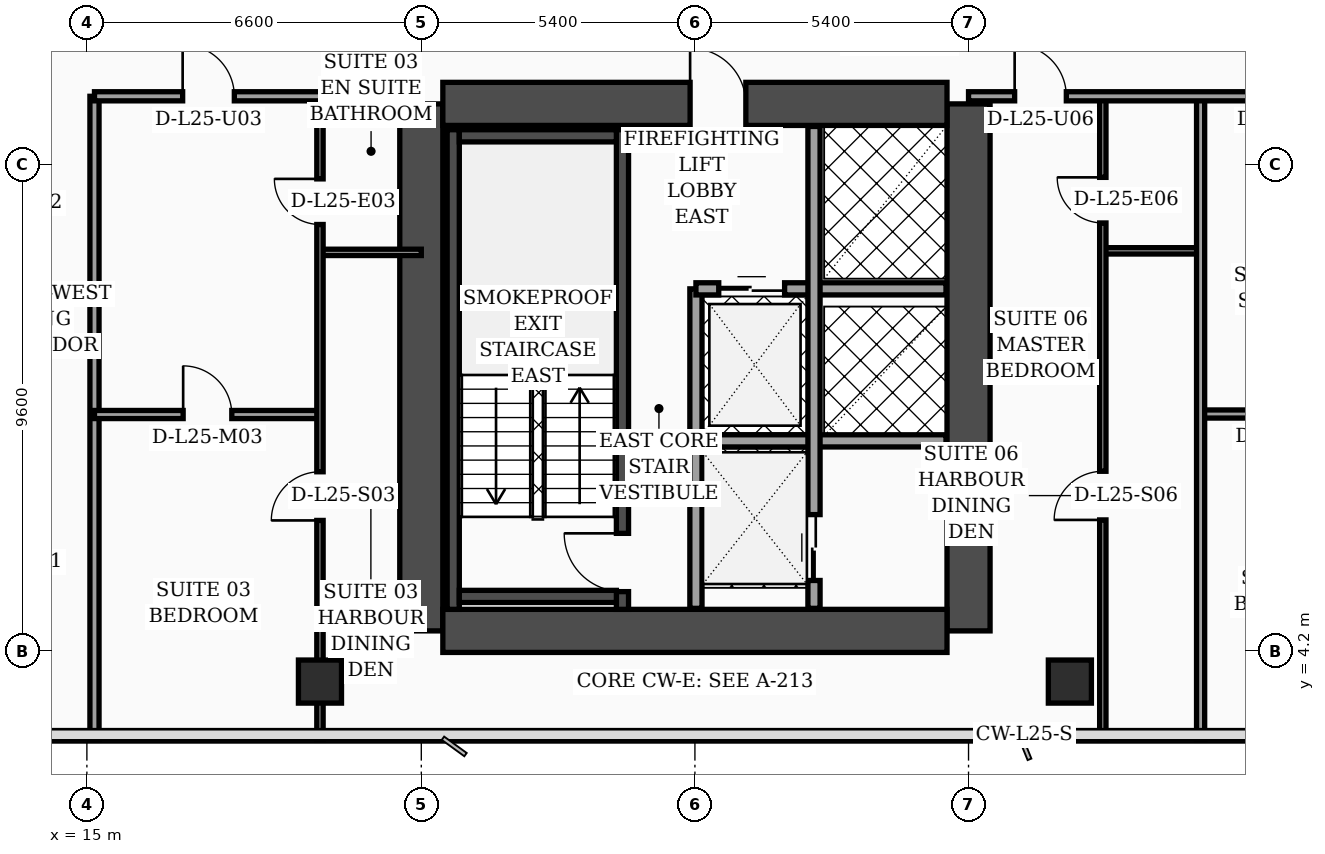
"""IFC4 building model, lengths in metres.
Left out: names, types, materials, properties, quantities, classifications, styles, units other than length and angle.
Written with IfcOpenShell. Run it as: python <this file> out.ifc"""

import sys

from ifc_helpers import new_model, si_unit, direction, frame, frame_2d, origin, origin_2d, place, context, subcontext, project, spatial, rectangle, hollow_rectangle, extrude, element, fill, save


model = new_model("IFC4")
c1 = context("Model", 3, precision=1e-05, world=origin(), true_north=direction((0.0, 1.0)))
c2 = subcontext(c1, "Body", "Model", "MODEL_VIEW")
j1 = project(units=[si_unit("LENGTHUNIT", "METRE"), si_unit("PLANEANGLEUNIT", "RADIAN")], contexts=[c1])
p1 = place(None, origin())
s1 = spatial("IfcSite", under=j1, at=p1, CompositionType="ELEMENT")
p2 = place(p1, origin())
s2 = spatial("IfcBuilding", under=s1, at=p2, CompositionType="ELEMENT")
p3 = place(p2, frame((0.0, 0.0, 105.0)))
s3 = spatial("IfcBuildingStorey", under=s2, at=p3, CompositionType="ELEMENT", Elevation=105.0)
for number, where, z_axis, x_axis in (
    (1, (21.6, 4.6, 0.0), (0.0, 0.0, 1.0), (0.0, 1.0, 0.0)),
    (2, (32.4, 4.6, 0.0), (0.0, 0.0, 1.0), (0.0, 1.0, 0.0)),
):
    element("IfcWall", number, at=place(p3, frame(where, z_axis=z_axis, x_axis=x_axis)), inside=s3, PredefinedType="SHEAR", context=c2, shape_type="SweptSolid", body=[
        extrude(rectangle(XDim=10.4, YDim=0.85, at=frame_2d((5.2, 0.0))), origin(), (0.0, 0.0, 1.0), 3.56),
    ])
p4 = place(p3, frame((22.025, 15.0, 0.0), z_axis=(0.0, 0.0, 1.0), x_axis=(1.0, 0.0, 0.0)))
e3 = element("IfcWall", 3, at=p4, inside=s3, PredefinedType="SHEAR", context=c2, shape_type="SweptSolid", body=[
    extrude(rectangle(XDim=9.95, YDim=0.85, at=frame_2d((4.975, 0.0))), origin(), (0.0, 0.0, 1.0), 3.56),
])
p5 = place(p4, frame((4.88, 0.0, 0.0)))
e4 = element("IfcOpeningElement", 4, at=p5, cuts=e3, PredefinedType="OPENING", context=c2, shape_type="SweptSolid", body=[
    extrude(rectangle(XDim=1.1, YDim=2.2, at=frame_2d((0.55, 1.1))), frame((0.0, 0.435, 0.0), z_axis=(0.0, -1.0, 0.0), x_axis=(1.0, 0.0, 0.0)), (0.0, 0.0, 1.0), 0.87),
])
p6 = place(p3, frame((22.025, 4.6, 0.0), z_axis=(0.0, 0.0, 1.0), x_axis=(1.0, 0.0, 0.0)))
e5 = element("IfcWall", 5, at=p6, inside=s3, PredefinedType="SHEAR", context=c2, shape_type="SweptSolid", body=[
    extrude(rectangle(XDim=9.95, YDim=0.85, at=frame_2d((4.975, 0.0))), origin(), (0.0, 0.0, 1.0), 3.56),
])
p7 = place(p3, frame((22.23, 5.025, 0.0), z_axis=(0.0, 0.0, 1.0), x_axis=(0.0, 1.0, 0.0)))
e6 = element("IfcWall", 6, at=p7, inside=s3, PredefinedType="SOLIDWALL", context=c2, shape_type="SweptSolid", body=[
    extrude(rectangle(XDim=9.465, YDim=0.24, at=frame_2d((4.732, 0.0))), origin(), (0.0, 0.0, 1.0), 3.56),
])
p8 = place(p3, frame((25.57, 5.025, 0.0), z_axis=(0.0, 0.0, 1.0), x_axis=(0.0, 1.0, 0.0)))
e7 = element("IfcWall", 7, at=p8, inside=s3, PredefinedType="SOLIDWALL", context=c2, shape_type="SweptSolid", body=[
    extrude(rectangle(XDim=9.465, YDim=0.24, at=frame_2d((4.732, 0.0))), origin(), (0.0, 0.0, 1.0), 3.56),
])
p9 = place(p8, frame((0.35, 0.0, 0.0)))
e8 = element("IfcOpeningElement", 8, at=p9, cuts=e7, PredefinedType="OPENING", context=c2, shape_type="SweptSolid", body=[
    extrude(rectangle(XDim=1.15, YDim=2.2, at=frame_2d((0.575, 1.1))), frame((0.0, 0.13, 0.0), z_axis=(0.0, -1.0, 0.0), x_axis=(1.0, 0.0, 0.0)), (0.0, 0.0, 1.0), 0.26),
])
for number, where, z_axis, x_axis in (
    (9, (22.35, 5.28, 0.0), (0.0, 0.0, 1.0), (1.0, 0.0, 0.0)),
    (10, (22.35, 14.37, 0.0), (0.0, 0.0, 1.0), (1.0, 0.0, 0.0)),
):
    element("IfcWall", number, at=place(p3, frame(where, z_axis=z_axis, x_axis=x_axis)), inside=s3, PredefinedType="SOLIDWALL", context=c2, shape_type="SweptSolid", body=[
        extrude(rectangle(XDim=3.1, YDim=0.24, at=frame_2d((1.55, 0.0))), origin(), (0.0, 0.0, 1.0), 3.56),
    ])
for number, where, z_axis, x_axis in (
    (11, (19.6, 3.6, 0.0), (0.0, 0.0, 1.0), (1.0, 0.0, 0.0)),
    (12, (34.4, 3.6, 0.0), (0.0, 0.0, 1.0), (1.0, 0.0, 0.0)),
):
    element("IfcColumn", number, at=place(p3, frame(where, z_axis=z_axis, x_axis=x_axis)), inside=s3, PredefinedType="COLUMN", context=c2, shape_type="SweptSolid", body=[
        extrude(hollow_rectangle(XDim=0.85, YDim=0.85, WallThickness=0.036, at=origin_2d()), origin(), (0.0, 0.0, 1.0), 3.56),
    ])
p10 = place(p3, frame((27.02, 5.045, 0.0), z_axis=(0.0, 0.0, 1.0), x_axis=(0.0, 1.0, 0.0)))
e13 = element("IfcWall", 13, at=p10, inside=s3, PredefinedType="SOLIDWALL", context=c2, shape_type="SweptSolid", body=[
    extrude(rectangle(XDim=6.305, YDim=0.24, at=frame_2d((3.153, 0.0))), origin(), (0.0, 0.0, 1.0), 3.56),
])
p11 = place(p3, frame((27.02, 11.35, 0.0), z_axis=(0.0, 0.0, 1.0), x_axis=(1.0, 0.0, 0.0)))
e14 = element("IfcWall", 14, at=p11, inside=s3, PredefinedType="SOLIDWALL", context=c2, shape_type="SweptSolid", body=[
    extrude(rectangle(XDim=4.935, YDim=0.24, at=frame_2d((2.468, 0.0))), origin(), (0.0, 0.0, 1.0), 3.56),
])
p12 = place(p11, frame((0.45, 0.0, 0.0)))
e15 = element("IfcOpeningElement", 15, at=p12, cuts=e14, PredefinedType="OPENING", context=c2, shape_type="SweptSolid", body=[
    extrude(rectangle(XDim=1.3, YDim=2.35, at=frame_2d((0.65, 1.175))), frame((0.0, 0.13, 0.0), z_axis=(0.0, -1.0, 0.0), x_axis=(1.0, 0.0, 0.0)), (0.0, 0.0, 1.0), 0.26),
])
p13 = place(p3, frame((27.02, 8.35, 0.0), z_axis=(0.0, 0.0, 1.0), x_axis=(1.0, 0.0, 0.0)))
e16 = element("IfcWall", 16, at=p13, inside=s3, PredefinedType="SOLIDWALL", context=c2, shape_type="SweptSolid", body=[
    extrude(rectangle(XDim=4.935, YDim=0.24, at=frame_2d((2.468, 0.0))), origin(), (0.0, 0.0, 1.0), 3.56),
])
p14 = place(p3, frame((29.35, 5.045, 0.0), z_axis=(0.0, 0.0, 1.0), x_axis=(0.0, 1.0, 0.0)))
e17 = element("IfcWall", 17, at=p14, inside=s3, PredefinedType="SOLIDWALL", context=c2, shape_type="SweptSolid", body=[
    extrude(rectangle(XDim=9.51, YDim=0.24, at=frame_2d((4.755, 0.0))), origin(), (0.0, 0.0, 1.0), 3.56),
])
p15 = place(p14, frame((0.55, 0.0, 0.0)))
e18 = element("IfcOpeningElement", 18, at=p15, cuts=e17, PredefinedType="OPENING", context=c2, shape_type="SweptSolid", body=[
    extrude(rectangle(XDim=1.3, YDim=2.35, at=frame_2d((0.65, 1.175))), frame((0.0, 0.13, 0.0), z_axis=(0.0, -1.0, 0.0), x_axis=(1.0, 0.0, 0.0)), (0.0, 0.0, 1.0), 0.26),
])
p16 = place(p3, frame((15.15, 2.44, 0.0), z_axis=(0.0, 0.0, 1.0), x_axis=(0.0, 1.0, 0.0)))
e19 = element("IfcWall", 19, at=p16, inside=s3, PredefinedType="PARTITIONING", context=c2, shape_type="SweptSolid", body=[
    extrude(rectangle(XDim=12.71, YDim=0.18, at=frame_2d((6.355, 0.0))), origin(), (0.0, 0.0, 1.0), 3.04),
])
p17 = place(p3, frame((19.6, 12.07, 0.0), z_axis=(0.0, 0.0, 1.0), x_axis=(1.0, 0.0, 0.0)))
e20 = element("IfcWall", 20, at=p17, inside=s3, PredefinedType="PARTITIONING", context=c2, shape_type="SweptSolid", body=[
    extrude(rectangle(XDim=2.0, YDim=0.125, at=frame_2d((1.0, 0.0))), origin(), (0.0, 0.0, 1.0), 3.56),
])
p18 = place(p3, frame((15.15, 8.87, 0.0), z_axis=(0.0, 0.0, 1.0), x_axis=(1.0, 0.0, 0.0)))
e21 = element("IfcWall", 21, at=p18, inside=s3, PredefinedType="PARTITIONING", context=c2, shape_type="SweptSolid", body=[
    extrude(rectangle(XDim=4.45, YDim=0.16, at=frame_2d((2.225, 0.0))), origin(), (0.0, 0.0, 1.0), 3.56),
])
p19 = place(p18, frame((1.75, 0.0, 0.0)))
e22 = element("IfcOpeningElement", 22, at=p19, cuts=e21, PredefinedType="OPENING", context=c2, shape_type="SweptSolid", body=[
    extrude(rectangle(XDim=0.96, YDim=2.2, at=frame_2d((0.48, 1.1))), frame((0.0, 0.09, 0.0), z_axis=(0.0, -1.0, 0.0), x_axis=(1.0, 0.0, 0.0)), (0.0, 0.0, 1.0), 0.18),
])
p20 = place(p3, frame((19.6, 2.44, 0.0), z_axis=(0.0, 0.0, 1.0), x_axis=(0.0, 1.0, 0.0)))
e23 = element("IfcWall", 23, at=p20, inside=s3, PredefinedType="PARTITIONING", context=c2, shape_type="SweptSolid", body=[
    extrude(rectangle(XDim=12.71, YDim=0.125, at=frame_2d((6.355, 0.0))), origin(), (0.0, 0.0, 1.0), 2.49),
])
p21 = place(p20, frame((4.34, 0.0, 0.0)))
e24 = element("IfcOpeningElement", 24, at=p21, cuts=e23, PredefinedType="OPENING", context=c2, shape_type="SweptSolid", body=[
    extrude(rectangle(XDim=0.96, YDim=2.2, at=frame_2d((0.48, 1.1))), frame((0.0, 0.073, 0.0), z_axis=(0.0, -1.0, 0.0), x_axis=(1.0, 0.0, 0.0)), (0.0, 0.0, 1.0), 0.145),
])
p22 = place(p20, frame((10.18, 0.0, 0.0)))
e25 = element("IfcOpeningElement", 25, at=p22, cuts=e23, PredefinedType="OPENING", context=c2, shape_type="SweptSolid", body=[
    extrude(rectangle(XDim=0.9, YDim=2.15, at=frame_2d((0.45, 1.075))), frame((0.0, 0.073, 0.0), z_axis=(0.0, -1.0, 0.0), x_axis=(1.0, 0.0, 0.0)), (0.0, 0.0, 1.0), 0.145),
])
p23 = place(p3, frame((15.15, 15.15, 0.0), z_axis=(0.0, 0.0, 1.0), x_axis=(1.0, 0.0, 0.0)))
e26 = element("IfcWall", 26, at=p23, inside=s3, PredefinedType="PARTITIONING", context=c2, shape_type="SweptSolid", body=[
    extrude(rectangle(XDim=6.45, YDim=0.18, at=frame_2d((3.225, 0.0))), origin(), (0.0, 0.0, 1.0), 2.49),
])
p24 = place(p23, frame((1.74, 0.0, 0.0)))
e27 = element("IfcOpeningElement", 27, at=p24, cuts=e26, PredefinedType="OPENING", context=c2, shape_type="SweptSolid", body=[
    extrude(rectangle(XDim=1.02, YDim=2.2, at=frame_2d((0.51, 1.1))), frame((0.0, 0.1, 0.0), z_axis=(0.0, -1.0, 0.0), x_axis=(1.0, 0.0, 0.0)), (0.0, 0.0, 1.0), 0.2),
])
p25 = place(p3, frame((35.05, 12.1, 0.0), z_axis=(0.0, 0.0, 1.0), x_axis=(1.0, 0.0, 0.0)))
e28 = element("IfcWall", 28, at=p25, inside=s3, PredefinedType="PARTITIONING", context=c2, shape_type="SweptSolid", body=[
    extrude(rectangle(XDim=1.93, YDim=0.125, at=frame_2d((0.965, 0.0))), origin(), (0.0, 0.0, 1.0), 2.84),
])
p26 = place(p3, frame((35.05, 2.44, 0.0), z_axis=(0.0, 0.0, 1.0), x_axis=(0.0, 1.0, 0.0)))
e29 = element("IfcWall", 29, at=p26, inside=s3, PredefinedType="PARTITIONING", context=c2, shape_type="SweptSolid", body=[
    extrude(rectangle(XDim=12.71, YDim=0.125, at=frame_2d((6.355, 0.0))), origin(), (0.0, 0.0, 1.0), 2.84),
])
p27 = place(p26, frame((4.35, 0.0, 0.0)))
e30 = element("IfcOpeningElement", 30, at=p27, cuts=e29, PredefinedType="OPENING", context=c2, shape_type="SweptSolid", body=[
    extrude(rectangle(XDim=0.96, YDim=2.2, at=frame_2d((0.48, 1.1))), frame((0.0, 0.073, 0.0), z_axis=(0.0, -1.0, 0.0), x_axis=(1.0, 0.0, 0.0)), (0.0, 0.0, 1.0), 0.145),
])
p28 = place(p26, frame((10.21, 0.0, 0.0)))
e31 = element("IfcOpeningElement", 31, at=p28, cuts=e29, PredefinedType="OPENING", context=c2, shape_type="SweptSolid", body=[
    extrude(rectangle(XDim=0.9, YDim=2.15, at=frame_2d((0.45, 1.075))), frame((0.0, 0.073, 0.0), z_axis=(0.0, -1.0, 0.0), x_axis=(1.0, 0.0, 0.0)), (0.0, 0.0, 1.0), 0.145),
])
p29 = place(p3, frame((36.98, 8.88, 0.0), z_axis=(0.0, 0.0, 1.0), x_axis=(1.0, 0.0, 0.0)))
e32 = element("IfcWall", 32, at=p29, inside=s3, PredefinedType="PARTITIONING", context=c2, shape_type="SweptSolid", body=[
    extrude(rectangle(XDim=3.56, YDim=0.16, at=frame_2d((1.78, 0.0))), origin(), (0.0, 0.0, 1.0), 2.84),
])
p30 = place(p29, frame((1.3, 0.0, 0.0)))
e33 = element("IfcOpeningElement", 33, at=p30, cuts=e32, PredefinedType="OPENING", context=c2, shape_type="SweptSolid", body=[
    extrude(rectangle(XDim=0.96, YDim=2.2, at=frame_2d((0.48, 1.1))), frame((0.0, 0.09, 0.0), z_axis=(0.0, -1.0, 0.0), x_axis=(1.0, 0.0, 0.0)), (0.0, 0.0, 1.0), 0.18),
])
p31 = place(p3, frame((36.98, 2.44, 0.0), z_axis=(0.0, 0.0, 1.0), x_axis=(0.0, 1.0, 0.0)))
e34 = element("IfcWall", 34, at=p31, inside=s3, PredefinedType="PARTITIONING", context=c2, shape_type="SweptSolid", body=[
    extrude(rectangle(XDim=12.71, YDim=0.16, at=frame_2d((6.355, 0.0))), origin(), (0.0, 0.0, 1.0), 2.84),
])
p32 = place(p3, frame((32.4, 15.15, 0.0), z_axis=(0.0, 0.0, 1.0), x_axis=(1.0, 0.0, 0.0)))
e35 = element("IfcWall", 35, at=p32, inside=s3, PredefinedType="PARTITIONING", context=c2, shape_type="SweptSolid", body=[
    extrude(rectangle(XDim=15.0, YDim=0.18, at=frame_2d((7.5, 0.0))), origin(), (0.0, 0.0, 1.0), 2.84),
])
p33 = place(p32, frame((0.91, 0.0, 0.0)))
e36 = element("IfcOpeningElement", 36, at=p33, cuts=e35, PredefinedType="OPENING", context=c2, shape_type="SweptSolid", body=[
    extrude(rectangle(XDim=1.02, YDim=2.2, at=frame_2d((0.51, 1.1))), frame((0.0, 0.1, 0.0), z_axis=(0.0, -1.0, 0.0), x_axis=(1.0, 0.0, 0.0)), (0.0, 0.0, 1.0), 0.2),
])
p34 = place(p32, frame((5.85, 0.0, 0.0)))
e37 = element("IfcOpeningElement", 37, at=p34, cuts=e35, PredefinedType="OPENING", context=c2, shape_type="SweptSolid", body=[
    extrude(rectangle(XDim=1.02, YDim=2.2, at=frame_2d((0.51, 1.1))), frame((0.0, 0.1, 0.0), z_axis=(0.0, -1.0, 0.0), x_axis=(1.0, 0.0, 0.0)), (0.0, 0.0, 1.0), 0.2),
])
p35 = place(p32, frame((11.06, 0.0, 0.0)))
e38 = element("IfcOpeningElement", 38, at=p35, cuts=e35, PredefinedType="OPENING", context=c2, shape_type="SweptSolid", body=[
    extrude(rectangle(XDim=1.02, YDim=2.2, at=frame_2d((0.51, 1.1))), frame((0.0, 0.1, 0.0), z_axis=(0.0, -1.0, 0.0), x_axis=(1.0, 0.0, 0.0)), (0.0, 0.0, 1.0), 0.2),
])
p36 = place(p12, origin())
e39 = element("IfcDoor", 39, at=p36, inside=s3, OperationType="DOUBLE_DOOR_SLIDING", PredefinedType="DOOR", context=c2, shape_type="SweptSolid", body=[
    extrude(rectangle(XDim=1.3, YDim=2.35, at=frame_2d((0.65, 1.175))), frame((0.0, 0.025, 0.0), z_axis=(0.0, -1.0, 0.0), x_axis=(1.0, 0.0, 0.0)), (0.0, 0.0, 1.0), 0.05),
])
fill(e15, e39)
p37 = place(p15, origin())
e40 = element("IfcDoor", 40, at=p37, inside=s3, OperationType="DOUBLE_DOOR_SLIDING", PredefinedType="DOOR", context=c2, shape_type="SweptSolid", body=[
    extrude(rectangle(XDim=1.3, YDim=2.35, at=frame_2d((0.65, 1.175))), frame((0.0, 0.025, 0.0), z_axis=(0.0, -1.0, 0.0), x_axis=(1.0, 0.0, 0.0)), (0.0, 0.0, 1.0), 0.05),
])
fill(e18, e40)
p38 = place(p19, origin())
e41 = element("IfcDoor", 41, at=p38, inside=s3, OperationType="SINGLE_SWING_LEFT", PredefinedType="DOOR", context=c2, shape_type="SweptSolid", body=[
    extrude(rectangle(XDim=0.96, YDim=2.2, at=frame_2d((0.48, 1.1))), frame((0.0, 0.025, 0.0), z_axis=(0.0, -1.0, 0.0), x_axis=(1.0, 0.0, 0.0)), (0.0, 0.0, 1.0), 0.05),
])
fill(e22, e41)
p39 = place(p21, origin())
e42 = element("IfcDoor", 42, at=p39, inside=s3, OperationType="SINGLE_SWING_LEFT", PredefinedType="DOOR", context=c2, shape_type="SweptSolid", body=[
    extrude(rectangle(XDim=0.96, YDim=2.2, at=frame_2d((0.48, 1.1))), frame((0.0, 0.025, 0.0), z_axis=(0.0, -1.0, 0.0), x_axis=(1.0, 0.0, 0.0)), (0.0, 0.0, 1.0), 0.05),
])
fill(e24, e42)
p40 = place(p22, origin())
e43 = element("IfcDoor", 43, at=p40, inside=s3, OperationType="SINGLE_SWING_RIGHT", PredefinedType="DOOR", context=c2, shape_type="SweptSolid", body=[
    extrude(rectangle(XDim=0.9, YDim=2.15, at=frame_2d((0.45, 1.075))), frame((0.0, 0.025, 0.0), z_axis=(0.0, -1.0, 0.0), x_axis=(1.0, 0.0, 0.0)), (0.0, 0.0, 1.0), 0.05),
])
fill(e25, e43)
p41 = place(p24, origin())
e44 = element("IfcDoor", 44, at=p41, inside=s3, OperationType="SINGLE_SWING_LEFT", PredefinedType="DOOR", context=c2, shape_type="SweptSolid", body=[
    extrude(rectangle(XDim=1.02, YDim=2.2, at=frame_2d((0.51, 1.1))), frame((0.0, 0.025, 0.0), z_axis=(0.0, -1.0, 0.0), x_axis=(1.0, 0.0, 0.0)), (0.0, 0.0, 1.0), 0.05),
])
fill(e27, e44)
p42 = place(p27, origin())
e45 = element("IfcDoor", 45, at=p42, inside=s3, OperationType="SINGLE_SWING_LEFT", PredefinedType="DOOR", context=c2, shape_type="SweptSolid", body=[
    extrude(rectangle(XDim=0.96, YDim=2.2, at=frame_2d((0.48, 1.1))), frame((0.0, 0.025, 0.0), z_axis=(0.0, -1.0, 0.0), x_axis=(1.0, 0.0, 0.0)), (0.0, 0.0, 1.0), 0.05),
])
fill(e30, e45)
p43 = place(p28, origin())
e46 = element("IfcDoor", 46, at=p43, inside=s3, OperationType="SINGLE_SWING_RIGHT", PredefinedType="DOOR", context=c2, shape_type="SweptSolid", body=[
    extrude(rectangle(XDim=0.9, YDim=2.15, at=frame_2d((0.45, 1.075))), frame((0.0, 0.025, 0.0), z_axis=(0.0, -1.0, 0.0), x_axis=(1.0, 0.0, 0.0)), (0.0, 0.0, 1.0), 0.05),
])
fill(e31, e46)
p44 = place(p33, origin())
e47 = element("IfcDoor", 47, at=p44, inside=s3, OperationType="SINGLE_SWING_LEFT", PredefinedType="DOOR", context=c2, shape_type="SweptSolid", body=[
    extrude(rectangle(XDim=1.02, YDim=2.2, at=frame_2d((0.51, 1.1))), frame((0.0, 0.025, 0.0), z_axis=(0.0, -1.0, 0.0), x_axis=(1.0, 0.0, 0.0)), (0.0, 0.0, 1.0), 0.05),
])
fill(e36, e47)
p45 = place(p9, origin())
e48 = element("IfcDoor", 48, at=p45, inside=s3, OperationType="SINGLE_SWING_RIGHT", PredefinedType="DOOR", context=c2, shape_type="SweptSolid", body=[
    extrude(rectangle(XDim=1.15, YDim=2.2, at=frame_2d((0.575, 1.1))), frame((0.0, 0.025, 0.0), z_axis=(0.0, -1.0, 0.0), x_axis=(1.0, 0.0, 0.0)), (0.0, 0.0, 1.0), 0.05),
])
fill(e8, e48)
p46 = place(p5, origin())
e49 = element("IfcDoor", 49, at=p46, inside=s3, OperationType="SINGLE_SWING_LEFT", PredefinedType="DOOR", context=c2, shape_type="SweptSolid", body=[
    extrude(rectangle(XDim=1.1, YDim=2.2, at=frame_2d((0.55, 1.1))), frame((0.0, 0.025, 0.0), z_axis=(0.0, -1.0, 0.0), x_axis=(1.0, 0.0, 0.0)), (0.0, 0.0, 1.0), 0.05),
])
fill(e4, e49)
save(model, sys.argv[1])
